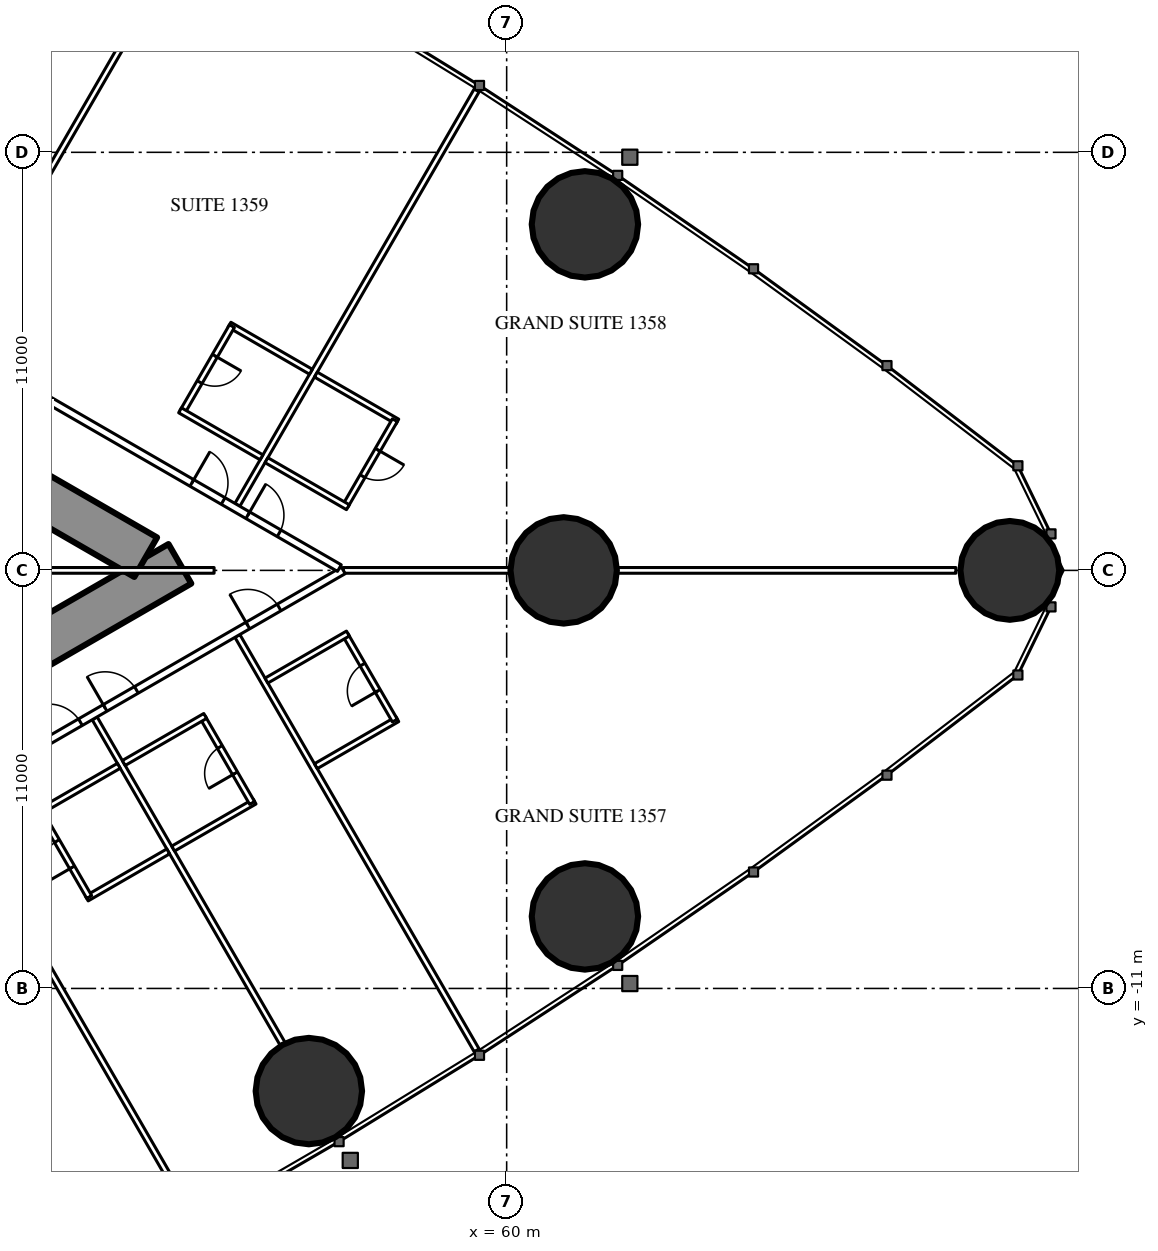
"""IFC4 building model, lengths in metres.
Left out: names, types, materials, properties, quantities, classifications, styles, units other than length and angle.
Written with IfcOpenShell. Run it as: python <this file> out.ifc"""

import sys

from ifc_helpers import new_model, si_unit, direction, frame, frame_2d, origin, origin_2d, place, context, subcontext, project, spatial, rectangle, hollow_circle, extrude, element, fill, save


model = new_model("IFC4")
c1 = context("Model", 3, precision=1e-05, world=origin(), true_north=direction((0.0, 1.0)))
c2 = subcontext(c1, "Body", "Model", "MODEL_VIEW")
j1 = project(units=[si_unit("LENGTHUNIT", "METRE"), si_unit("PLANEANGLEUNIT", "RADIAN")], contexts=[c1])
p1 = place(None, origin())
s1 = spatial("IfcSite", under=j1, at=p1, CompositionType="ELEMENT")
p2 = place(p1, origin())
s2 = spatial("IfcBuilding", under=s1, at=p2, CompositionType="ELEMENT")
p3 = place(p2, frame((0.0, 0.0, 53.0)))
s3 = spatial("IfcBuildingStorey", under=s2, at=p3, CompositionType="ELEMENT", Elevation=53.0)
p4 = place(p3, frame((73.239, 0.0, 0.0), z_axis=(0.0, 0.0, 1.0), x_axis=(1.0, 0.0, 0.0)))
e1 = element("IfcColumn", 1, at=p4, inside=s3, PredefinedType="COLUMN", context=c2, shape_type="SweptSolid", body=[
    extrude(hollow_circle(Radius=1.3, WallThickness=0.1, at=origin_2d()), origin(), (0.0, 0.0, 1.0), 3.5),
])
for number, where, z_axis, x_axis in (
    (2, (62.059, 9.105, 0.0), (0.0, 0.0, 1.0), (1.0, 0.0, 0.0)),
    (3, (54.795, -13.701, 0.0), (0.0, 0.0, 1.0), (1.0, 0.0, 0.0)),
    (4, (62.059, -9.105, 0.0), (0.0, 0.0, 1.0), (1.0, 0.0, 0.0)),
):
    element("IfcColumn", number, at=place(p3, frame(where, z_axis=z_axis, x_axis=x_axis)), inside=s3, PredefinedType="COLUMN", context=c2, shape_type="SweptSolid", body=[
        extrude(hollow_circle(Radius=1.4, WallThickness=0.12, at=origin_2d()), origin(), (0.0, 0.0, 1.0), 3.5),
    ])
p5 = place(p3, frame((61.5, 0.0, 0.0), z_axis=(0.0, 0.0, 1.0), x_axis=(1.0, 0.0, 0.0)))
e5 = element("IfcColumn", 5, at=p5, inside=s3, PredefinedType="COLUMN", context=c2, shape_type="SweptSolid", body=[
    extrude(hollow_circle(Radius=1.4, WallThickness=0.1, at=origin_2d()), origin(), (0.0, 0.0, 1.0), 3.5),
])
p6 = place(p3, frame((27.2, -13.8, 0.0), z_axis=(0.0, 0.0, 1.0), x_axis=(0.866027159892, 0.499996958321, 0.0)))
e6 = element("IfcWall", 6, at=p6, inside=s3, PredefinedType="SHEAR", context=c2, shape_type="SweptSolid", body=[
    extrude(rectangle(XDim=27.947, YDim=1.2, at=frame_2d((13.973, 0.0))), origin(), (0.0, 0.0, 1.0), 3.5),
])
p7 = place(p6, frame((4.6, 0.0, 0.0)))
e7 = element("IfcOpeningElement", 7, at=p7, cuts=e6, PredefinedType="OPENING", context=c2, shape_type="SweptSolid", body=[
    extrude(rectangle(XDim=1.0, YDim=2.2, at=frame_2d((0.5, 1.1))), frame((0.0, 0.61, 0.0), z_axis=(0.0, -1.0, 0.0), x_axis=(1.0, 0.0, 0.0)), (0.0, 0.0, 1.0), 1.22),
])
p8 = place(p6, frame((13.395, 0.0, 0.0)))
e8 = element("IfcOpeningElement", 8, at=p8, cuts=e6, PredefinedType="OPENING", context=c2, shape_type="SweptSolid", body=[
    extrude(rectangle(XDim=1.8, YDim=2.2, at=frame_2d((0.9, 1.1))), frame((0.0, 0.61, 0.0), z_axis=(0.0, -1.0, 0.0), x_axis=(1.0, 0.0, 0.0)), (0.0, 0.0, 1.0), 1.22),
])
p9 = place(p3, frame((27.2, 13.8, 0.0), z_axis=(0.0, 0.0, 1.0), x_axis=(0.866024515034, -0.500001539357, 0.0)))
e9 = element("IfcWall", 9, at=p9, inside=s3, PredefinedType="SHEAR", context=c2, shape_type="SweptSolid", body=[
    extrude(rectangle(XDim=26.907, YDim=1.2, at=frame_2d((13.454, 0.0))), origin(), (0.0, 0.0, 1.0), 3.5),
])
p10 = place(p9, frame((4.6, 0.0, 0.0)))
e10 = element("IfcOpeningElement", 10, at=p10, cuts=e9, PredefinedType="OPENING", context=c2, shape_type="SweptSolid", body=[
    extrude(rectangle(XDim=1.0, YDim=2.2, at=frame_2d((0.5, 1.1))), frame((0.0, 0.61, 0.0), z_axis=(0.0, -1.0, 0.0), x_axis=(1.0, 0.0, 0.0)), (0.0, 0.0, 1.0), 1.22),
])
p11 = place(p9, frame((13.395, 0.0, 0.0)))
e11 = element("IfcOpeningElement", 11, at=p11, cuts=e9, PredefinedType="OPENING", context=c2, shape_type="SweptSolid", body=[
    extrude(rectangle(XDim=1.8, YDim=2.2, at=frame_2d((0.9, 1.1))), frame((0.0, 0.61, 0.0), z_axis=(0.0, -1.0, 0.0), x_axis=(1.0, 0.0, 0.0)), (0.0, 0.0, 1.0), 1.22),
])
p12 = place(p3, frame((45.403, -6.062, 0.0), z_axis=(0.0, 0.0, 1.0), x_axis=(0.500007077968, -0.866021317279, 0.0)))
e12 = element("IfcWall", 12, at=p12, inside=s3, PredefinedType="PARTITIONING", context=c2, shape_type="SweptSolid", body=[
    extrude(rectangle(XDim=12.721, YDim=0.15, at=frame_2d((6.361, 0.0))), origin(), (0.0, 0.0, 1.0), 3.25),
])
p13 = place(p3, frame((49.159, -3.893, 0.0), z_axis=(0.0, 0.0, 1.0), x_axis=(0.499998773722, -0.866026111775, 0.0)))
e13 = element("IfcWall", 13, at=p13, inside=s3, PredefinedType="PARTITIONING", context=c2, shape_type="SweptSolid", body=[
    extrude(rectangle(XDim=9.892, YDim=0.15, at=frame_2d((4.946, 0.0))), origin(), (0.0, 0.0, 1.0), 2.25),
])
p14 = place(p3, frame((52.915, -1.725, 0.0), z_axis=(0.0, 0.0, 1.0), x_axis=(0.499997163113, -0.866027041656, 0.0)))
e14 = element("IfcWall", 14, at=p14, inside=s3, PredefinedType="PARTITIONING", context=c2, shape_type="SweptSolid", body=[
    extrude(rectangle(XDim=12.591, YDim=0.15, at=frame_2d((6.295, 0.0))), origin(), (0.0, 0.0, 1.0), 3.25),
])
p15 = place(p3, frame((45.403, 6.062, 0.0), z_axis=(0.0, 0.0, 1.0), x_axis=(0.500013434677, 0.866017647131, 0.0)))
e15 = element("IfcWall", 15, at=p15, inside=s3, PredefinedType="PARTITIONING", context=c2, shape_type="SweptSolid", body=[
    extrude(rectangle(XDim=9.902, YDim=0.15, at=frame_2d((4.951, 0.0))), origin(), (0.0, 0.0, 1.0), 2.25),
])
p16 = place(p3, frame((52.915, 1.725, 0.0), z_axis=(0.0, 0.0, 1.0), x_axis=(0.499997163113, 0.866027041656, 0.0)))
e16 = element("IfcWall", 16, at=p16, inside=s3, PredefinedType="PARTITIONING", context=c2, shape_type="SweptSolid", body=[
    extrude(rectangle(XDim=12.591, YDim=0.15, at=frame_2d((6.295, 0.0))), origin(), (0.0, 0.0, 1.0), 3.25),
])
p17 = place(p3, frame((55.702, 0.0, 0.0), z_axis=(0.0, 0.0, 1.0), x_axis=(1.0, 0.0, 0.0)))
e17 = element("IfcWall", 17, at=p17, inside=s3, PredefinedType="PARTITIONING", context=c2, shape_type="SweptSolid", body=[
    extrude(rectangle(XDim=16.117, YDim=0.15, at=frame_2d((8.059, 0.0))), origin(), (0.0, 0.0, 1.0), 2.25),
])
p18 = place(p3, frame((37.96, -10.243, 0.0), z_axis=(0.0, 0.0, 1.0), x_axis=(0.866026429433, 0.499998223521, 0.0)))
e18 = element("IfcWall", 18, at=p18, inside=s3, PredefinedType="PARTITIONING", context=c2, shape_type="SweptSolid", body=[
    extrude(rectangle(XDim=20.487, YDim=0.2, at=frame_2d((10.243, 0.0))), origin(), (0.0, 0.0, 1.0), 3.25),
])
p19 = place(p18, frame((6.925, 0.0, 0.0)))
e19 = element("IfcOpeningElement", 19, at=p19, cuts=e18, PredefinedType="OPENING", context=c2, shape_type="SweptSolid", body=[
    extrude(rectangle(XDim=0.95, YDim=2.2, at=frame_2d((0.475, 1.1))), frame((0.0, 0.11, 0.0), z_axis=(0.0, -1.0, 0.0), x_axis=(1.0, 0.0, 0.0)), (0.0, 0.0, 1.0), 0.22),
])
p20 = place(p18, frame((11.549, 0.0, 0.0)))
e20 = element("IfcOpeningElement", 20, at=p20, cuts=e18, PredefinedType="OPENING", context=c2, shape_type="SweptSolid", body=[
    extrude(rectangle(XDim=0.95, YDim=2.2, at=frame_2d((0.475, 1.1))), frame((0.0, 0.11, 0.0), z_axis=(0.0, -1.0, 0.0), x_axis=(1.0, 0.0, 0.0)), (0.0, 0.0, 1.0), 0.22),
])
p21 = place(p18, frame((13.249, 0.0, 0.0)))
e21 = element("IfcOpeningElement", 21, at=p21, cuts=e18, PredefinedType="OPENING", context=c2, shape_type="SweptSolid", body=[
    extrude(rectangle(XDim=0.95, YDim=2.2, at=frame_2d((0.475, 1.1))), frame((0.0, 0.11, 0.0), z_axis=(0.0, -1.0, 0.0), x_axis=(1.0, 0.0, 0.0)), (0.0, 0.0, 1.0), 0.22),
])
p22 = place(p18, frame((17.585, 0.0, 0.0)))
e22 = element("IfcOpeningElement", 22, at=p22, cuts=e18, PredefinedType="OPENING", context=c2, shape_type="SweptSolid", body=[
    extrude(rectangle(XDim=0.95, YDim=2.2, at=frame_2d((0.475, 1.1))), frame((0.0, 0.11, 0.0), z_axis=(0.0, -1.0, 0.0), x_axis=(1.0, 0.0, 0.0)), (0.0, 0.0, 1.0), 0.22),
])
p23 = place(p18, frame((0.6, 0.0, 0.0)))
e23 = element("IfcOpeningElement", 23, at=p23, cuts=e18, PredefinedType="OPENING", context=c2, shape_type="SweptSolid", body=[
    extrude(rectangle(XDim=0.95, YDim=2.2, at=frame_2d((0.475, 1.1))), frame((0.0, 0.11, 0.0), z_axis=(0.0, -1.0, 0.0), x_axis=(1.0, 0.0, 0.0)), (0.0, 0.0, 1.0), 0.22),
])
p24 = place(p3, frame((45.375, 5.963, 0.0), z_axis=(0.0, 0.0, 1.0), x_axis=(0.86603164725, -0.499989185844, 0.0)))
e24 = element("IfcWall", 24, at=p24, inside=s3, PredefinedType="PARTITIONING", context=c2, shape_type="SweptSolid", body=[
    extrude(rectangle(XDim=11.805, YDim=0.2, at=frame_2d((5.903, 0.0))), origin(), (0.0, 0.0, 1.0), 3.25),
])
p25 = place(p24, frame((9.024, 0.0, 0.0)))
e25 = element("IfcOpeningElement", 25, at=p25, cuts=e24, PredefinedType="OPENING", context=c2, shape_type="SweptSolid", body=[
    extrude(rectangle(XDim=0.95, YDim=2.2, at=frame_2d((0.475, 1.1))), frame((0.0, 0.11, 0.0), z_axis=(0.0, -1.0, 0.0), x_axis=(1.0, 0.0, 0.0)), (0.0, 0.0, 1.0), 0.22),
])
p26 = place(p24, frame((7.324, 0.0, 0.0)))
e26 = element("IfcOpeningElement", 26, at=p26, cuts=e24, PredefinedType="OPENING", context=c2, shape_type="SweptSolid", body=[
    extrude(rectangle(XDim=0.95, YDim=2.2, at=frame_2d((0.475, 1.1))), frame((0.0, 0.11, 0.0), z_axis=(0.0, -1.0, 0.0), x_axis=(1.0, 0.0, 0.0)), (0.0, 0.0, 1.0), 0.22),
])
p27 = place(p3, frame((48.951, -8.632, 0.0), z_axis=(0.0, 0.0, 1.0), x_axis=(0.866006523861, 0.500032699561, 0.0)))
e27 = element("IfcWall", 27, at=p27, inside=s3, PredefinedType="PARTITIONING", context=c2, shape_type="SweptSolid", body=[
    extrude(rectangle(XDim=2.475, YDim=0.15, at=frame_2d((1.237, 0.0))), origin(), (0.0, 0.0, 1.0), 3.25),
])
p28 = place(p3, frame((47.716, -6.343, 0.0), z_axis=(0.0, 0.0, 1.0), x_axis=(0.500006934395, -0.866021400173, 0.0)))
e28 = element("IfcWall", 28, at=p28, inside=s3, PredefinedType="PARTITIONING", context=c2, shape_type="SweptSolid", body=[
    extrude(rectangle(XDim=2.6, YDim=0.15, at=frame_2d((1.3, 0.0))), origin(), (0.0, 0.0, 1.0), 3.25),
])
p29 = place(p28, frame((0.9, 0.0, 0.0)))
e29 = element("IfcOpeningElement", 29, at=p29, cuts=e28, PredefinedType="OPENING", context=c2, shape_type="SweptSolid", body=[
    extrude(rectangle(XDim=0.8, YDim=2.2, at=frame_2d((0.4, 1.1))), frame((0.0, 0.085, 0.0), z_axis=(0.0, -1.0, 0.0), x_axis=(1.0, 0.0, 0.0)), (0.0, 0.0, 1.0), 0.17),
])
for number, where, z_axis, x_axis in (
    (30, (47.651, -6.38, 0.0), (0.0, 0.0, 1.0), (0.866, 0.5, 0.0)),
    (31, (51.224, -7.32, 0.0), (0.0, 0.0, 1.0), (0.866, 0.5, 0.0)),
):
    element("IfcWall", number, at=place(p3, frame(where, z_axis=z_axis, x_axis=x_axis)), inside=s3, PredefinedType="PARTITIONING", context=c2, shape_type="SweptSolid", body=[
        extrude(rectangle(XDim=2.475, YDim=0.15, at=frame_2d((1.238, 0.0))), origin(), (0.0, 0.0, 1.0), 3.25),
    ])
p30 = place(p3, frame((52.003, -3.868, 0.0), z_axis=(0.0, 0.0, 1.0), x_axis=(0.500047596559, -0.865997922154, 0.0)))
e32 = element("IfcWall", 32, at=p30, inside=s3, PredefinedType="PARTITIONING", context=c2, shape_type="SweptSolid", body=[
    extrude(rectangle(XDim=2.6, YDim=0.15, at=frame_2d((1.3, 0.0))), origin(), (0.0, 0.0, 1.0), 3.25),
])
p31 = place(p30, frame((0.9, 0.0, 0.0)))
e33 = element("IfcOpeningElement", 33, at=p31, cuts=e32, PredefinedType="OPENING", context=c2, shape_type="SweptSolid", body=[
    extrude(rectangle(XDim=0.8, YDim=2.2, at=frame_2d((0.4, 1.1))), frame((0.0, 0.085, 0.0), z_axis=(0.0, -1.0, 0.0), x_axis=(1.0, 0.0, 0.0)), (0.0, 0.0, 1.0), 0.17),
])
for number, where, z_axis, x_axis in (
    (34, (49.925, -5.068, 0.0), (0.0, 0.0, 1.0), (0.866, 0.5, 0.0)),
    (35, (54.98, -5.151, 0.0), (0.0, 0.0, 1.0), (0.866, 0.5, 0.0)),
):
    element("IfcWall", number, at=place(p3, frame(where, z_axis=z_axis, x_axis=x_axis)), inside=s3, PredefinedType="PARTITIONING", context=c2, shape_type="SweptSolid", body=[
        extrude(rectangle(XDim=2.475, YDim=0.15, at=frame_2d((1.237, 0.0))), origin(), (0.0, 0.0, 1.0), 3.25),
    ])
p32 = place(p3, frame((55.758, -1.7, 0.0), z_axis=(0.0, 0.0, 1.0), x_axis=(0.500006934395, -0.866021400173, 0.0)))
e36 = element("IfcWall", 36, at=p32, inside=s3, PredefinedType="PARTITIONING", context=c2, shape_type="SweptSolid", body=[
    extrude(rectangle(XDim=2.6, YDim=0.15, at=frame_2d((1.3, 0.0))), origin(), (0.0, 0.0, 1.0), 3.25),
])
p33 = place(p32, frame((0.9, 0.0, 0.0)))
e37 = element("IfcOpeningElement", 37, at=p33, cuts=e36, PredefinedType="OPENING", context=c2, shape_type="SweptSolid", body=[
    extrude(rectangle(XDim=0.8, YDim=2.2, at=frame_2d((0.4, 1.1))), frame((0.0, 0.085, 0.0), z_axis=(0.0, -1.0, 0.0), x_axis=(1.0, 0.0, 0.0)), (0.0, 0.0, 1.0), 0.17),
])
for number, where, z_axis, x_axis in (
    (38, (53.68, -2.9, 0.0), (0.0, 0.0, 1.0), (0.866, 0.5, 0.0)),
    (39, (54.98, 5.151, 0.0), (0.0, 0.0, 1.0), (0.866, -0.5, 0.0)),
):
    element("IfcWall", number, at=place(p3, frame(where, z_axis=z_axis, x_axis=x_axis)), inside=s3, PredefinedType="PARTITIONING", context=c2, shape_type="SweptSolid", body=[
        extrude(rectangle(XDim=2.475, YDim=0.15, at=frame_2d((1.237, 0.0))), origin(), (0.0, 0.0, 1.0), 3.25),
    ])
p34 = place(p3, frame((55.758, 1.7, 0.0), z_axis=(0.0, 0.0, 1.0), x_axis=(0.500006934395, 0.866021400173, 0.0)))
e40 = element("IfcWall", 40, at=p34, inside=s3, PredefinedType="PARTITIONING", context=c2, shape_type="SweptSolid", body=[
    extrude(rectangle(XDim=2.6, YDim=0.15, at=frame_2d((1.3, 0.0))), origin(), (0.0, 0.0, 1.0), 3.25),
])
p35 = place(p34, frame((0.9, 0.0, 0.0)))
e41 = element("IfcOpeningElement", 41, at=p35, cuts=e40, PredefinedType="OPENING", context=c2, shape_type="SweptSolid", body=[
    extrude(rectangle(XDim=0.8, YDim=2.2, at=frame_2d((0.4, 1.1))), frame((0.0, 0.085, 0.0), z_axis=(0.0, -1.0, 0.0), x_axis=(1.0, 0.0, 0.0)), (0.0, 0.0, 1.0), 0.17),
])
for number, where, z_axis, x_axis in (
    (42, (53.68, 2.9, 0.0), (0.0, 0.0, 1.0), (0.866, -0.5, 0.0)),
    (43, (52.706, 6.464, 0.0), (0.0, 0.0, 1.0), (0.866, -0.5, 0.0)),
):
    element("IfcWall", number, at=place(p3, frame(where, z_axis=z_axis, x_axis=x_axis)), inside=s3, PredefinedType="PARTITIONING", context=c2, shape_type="SweptSolid", body=[
        extrude(rectangle(XDim=2.475, YDim=0.15, at=frame_2d((1.237, 0.0))), origin(), (0.0, 0.0, 1.0), 3.25),
    ])
p36 = place(p3, frame((51.471, 4.175, 0.0), z_axis=(0.0, 0.0, 1.0), x_axis=(0.500006934395, 0.866021400173, 0.0)))
e44 = element("IfcWall", 44, at=p36, inside=s3, PredefinedType="PARTITIONING", context=c2, shape_type="SweptSolid", body=[
    extrude(rectangle(XDim=2.6, YDim=0.15, at=frame_2d((1.3, 0.0))), origin(), (0.0, 0.0, 1.0), 3.25),
])
p37 = place(p36, frame((0.9, 0.0, 0.0)))
e45 = element("IfcOpeningElement", 45, at=p37, cuts=e44, PredefinedType="OPENING", context=c2, shape_type="SweptSolid", body=[
    extrude(rectangle(XDim=0.8, YDim=2.2, at=frame_2d((0.4, 1.1))), frame((0.0, 0.085, 0.0), z_axis=(0.0, -1.0, 0.0), x_axis=(1.0, 0.0, 0.0)), (0.0, 0.0, 1.0), 0.17),
])
p38 = place(p3, frame((51.406, 4.212, 0.0), z_axis=(0.0, 0.0, 1.0), x_axis=(0.866031185235, -0.4999899861, 0.0)))
e46 = element("IfcWall", 46, at=p38, inside=s3, PredefinedType="PARTITIONING", context=c2, shape_type="SweptSolid", body=[
    extrude(rectangle(XDim=2.475, YDim=0.15, at=frame_2d((1.238, 0.0))), origin(), (0.0, 0.0, 1.0), 3.25),
])
p39 = place(p3, frame((44.575, 0.0, 0.0), z_axis=(0.0, 0.0, 1.0), x_axis=(1.0, 0.0, 0.0)))
e47 = element("IfcWall", 47, at=p39, inside=s3, PredefinedType="PARTITIONING", context=c2, shape_type="SweptSolid", body=[
    extrude(rectangle(XDim=7.727, YDim=0.15, at=frame_2d((3.864, 0.0))), origin(), (0.0, 0.0, 1.0), 2.25),
])
p40 = place(p29, origin())
e48 = element("IfcDoor", 48, at=p40, inside=s3, OperationType="SINGLE_SWING_RIGHT", PredefinedType="DOOR", context=c2, shape_type="SweptSolid", body=[
    extrude(rectangle(XDim=0.8, YDim=2.2, at=frame_2d((0.4, 1.1))), frame((0.0, 0.025, 0.0), z_axis=(0.0, -1.0, 0.0), x_axis=(1.0, 0.0, 0.0)), (0.0, 0.0, 1.0), 0.05),
])
fill(e29, e48)
p41 = place(p20, origin())
e49 = element("IfcDoor", 49, at=p41, inside=s3, OperationType="SINGLE_SWING_LEFT", PredefinedType="DOOR", context=c2, shape_type="SweptSolid", body=[
    extrude(rectangle(XDim=0.95, YDim=2.2, at=frame_2d((0.475, 1.1))), frame((0.0, 0.025, 0.0), z_axis=(0.0, -1.0, 0.0), x_axis=(1.0, 0.0, 0.0)), (0.0, 0.0, 1.0), 0.05),
])
fill(e20, e49)
p42 = place(p31, origin())
e50 = element("IfcDoor", 50, at=p42, inside=s3, OperationType="SINGLE_SWING_RIGHT", PredefinedType="DOOR", context=c2, shape_type="SweptSolid", body=[
    extrude(rectangle(XDim=0.8, YDim=2.2, at=frame_2d((0.4, 1.1))), frame((0.0, 0.025, 0.0), z_axis=(0.0, -1.0, 0.0), x_axis=(1.0, 0.0, 0.0)), (0.0, 0.0, 1.0), 0.05),
])
fill(e33, e50)
p43 = place(p21, origin())
e51 = element("IfcDoor", 51, at=p43, inside=s3, OperationType="SINGLE_SWING_LEFT", PredefinedType="DOOR", context=c2, shape_type="SweptSolid", body=[
    extrude(rectangle(XDim=0.95, YDim=2.2, at=frame_2d((0.475, 1.1))), frame((0.0, 0.025, 0.0), z_axis=(0.0, -1.0, 0.0), x_axis=(1.0, 0.0, 0.0)), (0.0, 0.0, 1.0), 0.05),
])
fill(e21, e51)
p44 = place(p33, origin())
e52 = element("IfcDoor", 52, at=p44, inside=s3, OperationType="SINGLE_SWING_RIGHT", PredefinedType="DOOR", context=c2, shape_type="SweptSolid", body=[
    extrude(rectangle(XDim=0.8, YDim=2.2, at=frame_2d((0.4, 1.1))), frame((0.0, 0.025, 0.0), z_axis=(0.0, -1.0, 0.0), x_axis=(1.0, 0.0, 0.0)), (0.0, 0.0, 1.0), 0.05),
])
fill(e37, e52)
p45 = place(p22, origin())
e53 = element("IfcDoor", 53, at=p45, inside=s3, OperationType="SINGLE_SWING_LEFT", PredefinedType="DOOR", context=c2, shape_type="SweptSolid", body=[
    extrude(rectangle(XDim=0.95, YDim=2.2, at=frame_2d((0.475, 1.1))), frame((0.0, 0.025, 0.0), z_axis=(0.0, -1.0, 0.0), x_axis=(1.0, 0.0, 0.0)), (0.0, 0.0, 1.0), 0.05),
])
fill(e22, e53)
p46 = place(p35, origin())
e54 = element("IfcDoor", 54, at=p46, inside=s3, OperationType="SINGLE_SWING_RIGHT", PredefinedType="DOOR", context=c2, shape_type="SweptSolid", body=[
    extrude(rectangle(XDim=0.8, YDim=2.2, at=frame_2d((0.4, 1.1))), frame((0.0, 0.025, 0.0), z_axis=(0.0, -1.0, 0.0), x_axis=(1.0, 0.0, 0.0)), (0.0, 0.0, 1.0), 0.05),
])
fill(e41, e54)
p47 = place(p25, origin())
e55 = element("IfcDoor", 55, at=p47, inside=s3, OperationType="SINGLE_SWING_LEFT", PredefinedType="DOOR", context=c2, shape_type="SweptSolid", body=[
    extrude(rectangle(XDim=0.95, YDim=2.2, at=frame_2d((0.475, 1.1))), frame((0.0, 0.025, 0.0), z_axis=(0.0, -1.0, 0.0), x_axis=(1.0, 0.0, 0.0)), (0.0, 0.0, 1.0), 0.05),
])
fill(e25, e55)
p48 = place(p37, origin())
e56 = element("IfcDoor", 56, at=p48, inside=s3, OperationType="SINGLE_SWING_RIGHT", PredefinedType="DOOR", context=c2, shape_type="SweptSolid", body=[
    extrude(rectangle(XDim=0.8, YDim=2.2, at=frame_2d((0.4, 1.1))), frame((0.0, 0.025, 0.0), z_axis=(0.0, -1.0, 0.0), x_axis=(1.0, 0.0, 0.0)), (0.0, 0.0, 1.0), 0.05),
])
fill(e45, e56)
p49 = place(p26, origin())
e57 = element("IfcDoor", 57, at=p49, inside=s3, OperationType="SINGLE_SWING_LEFT", PredefinedType="DOOR", context=c2, shape_type="SweptSolid", body=[
    extrude(rectangle(XDim=0.95, YDim=2.2, at=frame_2d((0.475, 1.1))), frame((0.0, 0.025, 0.0), z_axis=(0.0, -1.0, 0.0), x_axis=(1.0, 0.0, 0.0)), (0.0, 0.0, 1.0), 0.05),
])
fill(e26, e57)
save(model, sys.argv[1])
